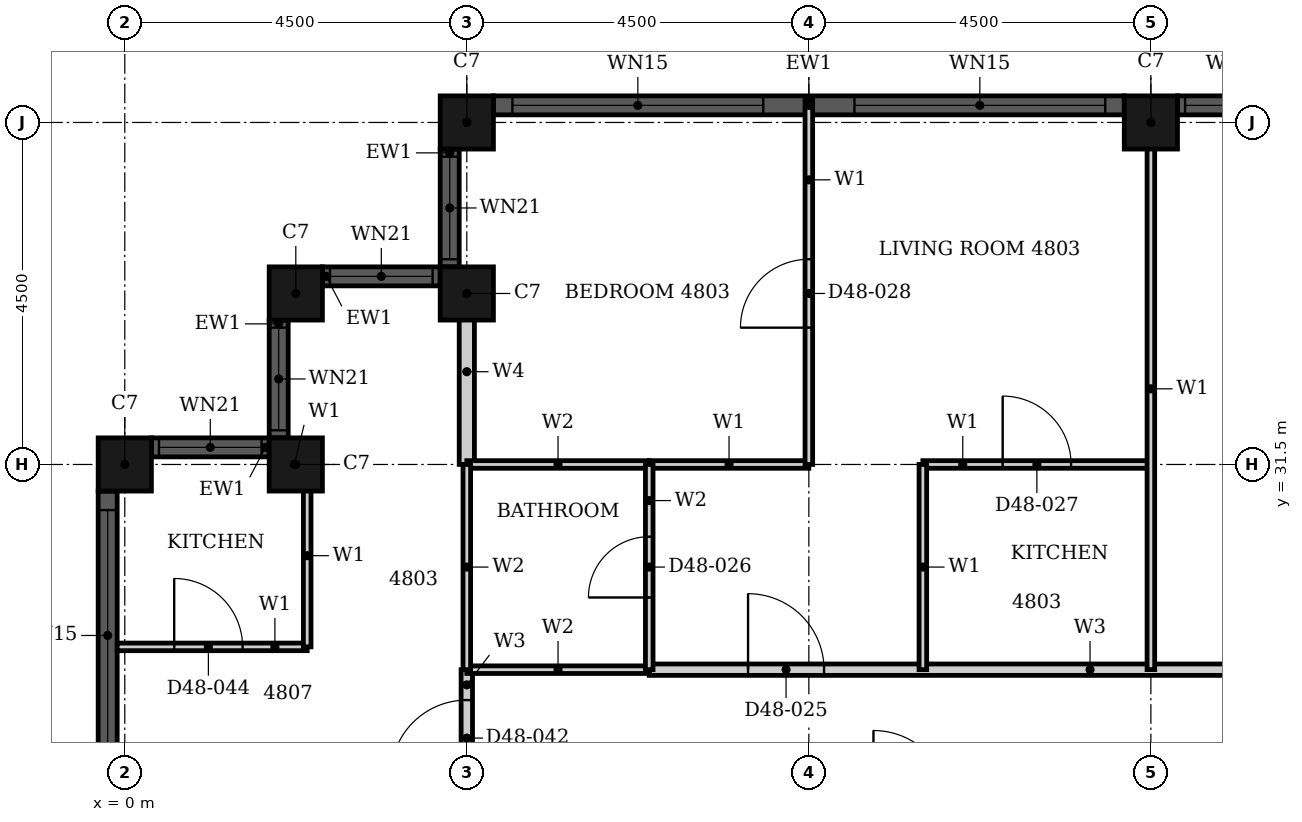
"""IFC4 building model, lengths in metres.
Left out: names, types, materials, properties, quantities, classifications, styles, units other than length and angle.
Written with IfcOpenShell. Run it as: python <this file> out.ifc"""

import sys

from ifc_helpers import new_model, si_unit, direction, frame, frame_2d, origin, origin_2d, place, context, subcontext, project, spatial, rectangle, hollow_rectangle, extrude, element, fill, save


model = new_model("IFC4")
c1 = context("Model", 3, precision=1e-05, world=origin(), true_north=direction((0.0, 1.0)))
c2 = subcontext(c1, "Body", "Model", "MODEL_VIEW")
j1 = project(units=[si_unit("LENGTHUNIT", "METRE"), si_unit("PLANEANGLEUNIT", "RADIAN")], contexts=[c1])
p1 = place(None, origin())
s1 = spatial("IfcSite", under=j1, at=p1, CompositionType="ELEMENT")
p2 = place(p1, origin())
s2 = spatial("IfcBuilding", under=s1, at=p2, CompositionType="ELEMENT")
p3 = place(p2, frame((0.0, 0.0, 192.4)))
s3 = spatial("IfcBuildingStorey", under=s2, at=p3, CompositionType="ELEMENT", Elevation=192.4)
for number, where, z_axis, x_axis in (
    (1, (13.5, 36.0, 0.0), (0.0, 0.0, 1.0), (1.0, 0.0, 0.0)),
    (2, (4.5, 36.0, 0.0), (0.0, 0.0, 1.0), (1.0, 0.0, 0.0)),
    (3, (4.5, 33.75, 0.0), (0.0, 0.0, 1.0), (1.0, 0.0, 0.0)),
    (4, (2.25, 33.75, 0.0), (0.0, 0.0, 1.0), (1.0, 0.0, 0.0)),
    (5, (2.25, 31.5, 0.0), (0.0, 0.0, 1.0), (1.0, 0.0, 0.0)),
    (6, (0.0, 31.5, 0.0), (0.0, 0.0, 1.0), (1.0, 0.0, 0.0)),
):
    element("IfcColumn", number, at=place(p3, frame(where, z_axis=z_axis, x_axis=x_axis)), inside=s3, PredefinedType="COLUMN", context=c2, shape_type="SweptSolid", body=[
        extrude(hollow_rectangle(XDim=0.7, YDim=0.7, WallThickness=0.022, at=origin_2d()), origin(), (0.0, 0.0, 1.0), 3.7),
    ])
p4 = place(p3, frame((15.4, 36.225, 0.0), z_axis=(0.0, 0.0, 1.0), x_axis=(-1.0, 0.0, 0.0)))
e7 = element("IfcWall", 7, at=p4, inside=s3, PredefinedType="SOLIDWALL", context=c2, shape_type="SweptSolid", body=[
    extrude(rectangle(XDim=1.55, YDim=0.25, at=frame_2d((0.775, 0.0))), origin(), (0.0, 0.0, 1.0), 3.7),
])
p5 = place(p4, frame((0.1, 0.0, 0.9)))
e8 = element("IfcOpeningElement", 8, at=p5, cuts=e7, PredefinedType="OPENING", context=c2, shape_type="SweptSolid", body=[
    extrude(rectangle(XDim=1.35, YDim=1.85, at=frame_2d((0.675, 0.925))), frame((0.0, 0.135, 0.0), z_axis=(0.0, -1.0, 0.0), x_axis=(1.0, 0.0, 0.0)), (0.0, 0.0, 1.0), 0.27),
])
p6 = place(p3, frame((13.15, 36.225, 0.0), z_axis=(0.0, 0.0, 1.0), x_axis=(-1.0, 0.0, 0.0)))
e9 = element("IfcWall", 9, at=p6, inside=s3, PredefinedType="SOLIDWALL", context=c2, shape_type="SweptSolid", body=[
    extrude(rectangle(XDim=8.3, YDim=0.25, at=frame_2d((4.15, 0.0))), origin(), (0.0, 0.0, 1.0), 3.7),
])
p7 = place(p6, frame((0.25, 0.0, 0.45)))
e10 = element("IfcOpeningElement", 10, at=p7, cuts=e9, PredefinedType="OPENING", context=c2, shape_type="SweptSolid", body=[
    extrude(rectangle(XDim=3.3, YDim=2.3, at=frame_2d((1.65, 1.15))), frame((0.0, 0.135, 0.0), z_axis=(0.0, -1.0, 0.0), x_axis=(1.0, 0.0, 0.0)), (0.0, 0.0, 1.0), 0.27),
])
p8 = place(p6, frame((4.75, 0.0, 0.45)))
e11 = element("IfcOpeningElement", 11, at=p8, cuts=e9, PredefinedType="OPENING", context=c2, shape_type="SweptSolid", body=[
    extrude(rectangle(XDim=3.3, YDim=2.3, at=frame_2d((1.65, 1.15))), frame((0.0, 0.135, 0.0), z_axis=(0.0, -1.0, 0.0), x_axis=(1.0, 0.0, 0.0)), (0.0, 0.0, 1.0), 0.27),
])
p9 = place(p3, frame((4.275, 35.65, 0.0), z_axis=(0.0, 0.0, 1.0), x_axis=(0.0, -1.0, 0.0)))
e12 = element("IfcWall", 12, at=p9, inside=s3, PredefinedType="SOLIDWALL", context=c2, shape_type="SweptSolid", body=[
    extrude(rectangle(XDim=1.55, YDim=0.25, at=frame_2d((0.775, 0.0))), origin(), (0.0, 0.0, 1.0), 3.7),
])
p10 = place(p9, frame((0.1, 0.0, 0.9)))
e13 = element("IfcOpeningElement", 13, at=p10, cuts=e12, PredefinedType="OPENING", context=c2, shape_type="SweptSolid", body=[
    extrude(rectangle(XDim=1.35, YDim=1.85, at=frame_2d((0.675, 0.925))), frame((0.0, 0.135, 0.0), z_axis=(0.0, -1.0, 0.0), x_axis=(1.0, 0.0, 0.0)), (0.0, 0.0, 1.0), 0.27),
])
p11 = place(p3, frame((4.15, 33.975, 0.0), z_axis=(0.0, 0.0, 1.0), x_axis=(-1.0, 0.0, 0.0)))
e14 = element("IfcWall", 14, at=p11, inside=s3, PredefinedType="SOLIDWALL", context=c2, shape_type="SweptSolid", body=[
    extrude(rectangle(XDim=1.55, YDim=0.25, at=frame_2d((0.775, 0.0))), origin(), (0.0, 0.0, 1.0), 3.7),
])
p12 = place(p11, frame((0.1, 0.0, 0.9)))
e15 = element("IfcOpeningElement", 15, at=p12, cuts=e14, PredefinedType="OPENING", context=c2, shape_type="SweptSolid", body=[
    extrude(rectangle(XDim=1.35, YDim=1.85, at=frame_2d((0.675, 0.925))), frame((0.0, 0.135, 0.0), z_axis=(0.0, -1.0, 0.0), x_axis=(1.0, 0.0, 0.0)), (0.0, 0.0, 1.0), 0.27),
])
p13 = place(p3, frame((2.025, 33.4, 0.0), z_axis=(0.0, 0.0, 1.0), x_axis=(0.0, -1.0, 0.0)))
e16 = element("IfcWall", 16, at=p13, inside=s3, PredefinedType="SOLIDWALL", context=c2, shape_type="SweptSolid", body=[
    extrude(rectangle(XDim=1.55, YDim=0.25, at=frame_2d((0.775, 0.0))), origin(), (0.0, 0.0, 1.0), 3.7),
])
p14 = place(p13, frame((0.1, 0.0, 0.9)))
e17 = element("IfcOpeningElement", 17, at=p14, cuts=e16, PredefinedType="OPENING", context=c2, shape_type="SweptSolid", body=[
    extrude(rectangle(XDim=1.35, YDim=1.85, at=frame_2d((0.675, 0.925))), frame((0.0, 0.135, 0.0), z_axis=(0.0, -1.0, 0.0), x_axis=(1.0, 0.0, 0.0)), (0.0, 0.0, 1.0), 0.27),
])
p15 = place(p3, frame((1.9, 31.725, 0.0), z_axis=(0.0, 0.0, 1.0), x_axis=(-1.0, 0.0, 0.0)))
e18 = element("IfcWall", 18, at=p15, inside=s3, PredefinedType="SOLIDWALL", context=c2, shape_type="SweptSolid", body=[
    extrude(rectangle(XDim=1.55, YDim=0.25, at=frame_2d((0.775, 0.0))), origin(), (0.0, 0.0, 1.0), 3.7),
])
p16 = place(p15, frame((0.1, 0.0, 0.9)))
e19 = element("IfcOpeningElement", 19, at=p16, cuts=e18, PredefinedType="OPENING", context=c2, shape_type="SweptSolid", body=[
    extrude(rectangle(XDim=1.35, YDim=1.85, at=frame_2d((0.675, 0.925))), frame((0.0, 0.135, 0.0), z_axis=(0.0, -1.0, 0.0), x_axis=(1.0, 0.0, 0.0)), (0.0, 0.0, 1.0), 0.27),
])
p17 = place(p3, frame((-0.225, 31.15, 0.0), z_axis=(0.0, 0.0, 1.0), x_axis=(0.0, -1.0, 0.0)))
e20 = element("IfcWall", 20, at=p17, inside=s3, PredefinedType="SOLIDWALL", context=c2, shape_type="SweptSolid", body=[
    extrude(rectangle(XDim=8.3, YDim=0.25, at=frame_2d((4.15, 0.0))), origin(), (0.0, 0.0, 1.0), 3.7),
])
p18 = place(p17, frame((0.25, 0.0, 0.45)))
e21 = element("IfcOpeningElement", 21, at=p18, cuts=e20, PredefinedType="OPENING", context=c2, shape_type="SweptSolid", body=[
    extrude(rectangle(XDim=3.3, YDim=2.3, at=frame_2d((1.65, 1.15))), frame((0.0, 0.135, 0.0), z_axis=(0.0, -1.0, 0.0), x_axis=(1.0, 0.0, 0.0)), (0.0, 0.0, 1.0), 0.27),
])
p19 = place(p17, frame((4.75, 0.0, 0.45)))
e22 = element("IfcOpeningElement", 22, at=p19, cuts=e20, PredefinedType="OPENING", context=c2, shape_type="SweptSolid", body=[
    extrude(rectangle(XDim=3.3, YDim=2.3, at=frame_2d((1.65, 1.15))), frame((0.0, 0.135, 0.0), z_axis=(0.0, -1.0, 0.0), x_axis=(1.0, 0.0, 0.0)), (0.0, 0.0, 1.0), 0.27),
])
p20 = place(p3, frame((6.9, 28.8, 0.0), z_axis=(0.0, 0.0, 1.0), x_axis=(1.0, 0.0, 0.0)))
e23 = element("IfcWall", 23, at=p20, inside=s3, PredefinedType="PARTITIONING", context=c2, shape_type="SweptSolid", body=[
    extrude(rectangle(XDim=9.299, YDim=0.15, at=frame_2d((4.649, 0.0))), origin(), (0.0, 0.0, 1.0), 3.4),
])
p21 = place(p20, frame((1.3, 0.0, 0.0)))
e24 = element("IfcOpeningElement", 24, at=p21, cuts=e23, PredefinedType="OPENING", context=c2, shape_type="SweptSolid", body=[
    extrude(rectangle(XDim=1.0, YDim=2.2, at=frame_2d((0.5, 1.1))), frame((0.0, 0.085, 0.0), z_axis=(0.0, -1.0, 0.0), x_axis=(1.0, 0.0, 0.0)), (0.0, 0.0, 1.0), 0.17),
])
p22 = place(p3, frame((4.5, 27.0, 0.0), z_axis=(0.0, 0.0, 1.0), x_axis=(0.0, 1.0, 0.0)))
e25 = element("IfcWall", 25, at=p22, inside=s3, PredefinedType="PARTITIONING", context=c2, shape_type="SweptSolid", body=[
    extrude(rectangle(XDim=1.8, YDim=0.15, at=frame_2d((0.9, 0.0))), origin(), (0.0, 0.0, 1.0), 3.4),
])
p23 = place(p22, frame((0.4, 0.0, 0.0)))
e26 = element("IfcOpeningElement", 26, at=p23, cuts=e25, PredefinedType="OPENING", context=c2, shape_type="SweptSolid", body=[
    extrude(rectangle(XDim=1.0, YDim=2.2, at=frame_2d((0.5, 1.1))), frame((0.0, 0.085, 0.0), z_axis=(0.0, -1.0, 0.0), x_axis=(1.0, 0.0, 0.0)), (0.0, 0.0, 1.0), 0.17),
])
p24 = place(p3, frame((-0.1, 29.1, 0.0), z_axis=(0.0, 0.0, 1.0), x_axis=(1.0, 0.0, 0.0)))
e27 = element("IfcWall", 27, at=p24, inside=s3, PredefinedType="PARTITIONING", context=c2, shape_type="SweptSolid", body=[
    extrude(rectangle(XDim=2.5, YDim=0.1, at=frame_2d((1.25, 0.0))), origin(), (0.0, 0.0, 1.0), 3.4),
])
p25 = place(p24, frame((0.75, 0.0, 0.0)))
e28 = element("IfcOpeningElement", 28, at=p25, cuts=e27, PredefinedType="OPENING", context=c2, shape_type="SweptSolid", body=[
    extrude(rectangle(XDim=0.9, YDim=2.1, at=frame_2d((0.45, 1.05))), frame((0.0, 0.06, 0.0), z_axis=(0.0, -1.0, 0.0), x_axis=(1.0, 0.0, 0.0)), (0.0, 0.0, 1.0), 0.12),
])
p26 = place(p3, frame((6.9, 31.5, 0.0), z_axis=(0.0, 0.0, 1.0), x_axis=(1.0, 0.0, 0.0)))
e29 = element("IfcWall", 29, at=p26, inside=s3, PredefinedType="PARTITIONING", context=c2, shape_type="SweptSolid", body=[
    extrude(rectangle(XDim=2.1, YDim=0.1, at=frame_2d((1.05, 0.0))), origin(), (0.0, 0.0, 1.0), 2.68),
])
p27 = place(p3, frame((10.5, 31.5, 0.0), z_axis=(0.0, 0.0, 1.0), x_axis=(1.0, 0.0, 0.0)))
e30 = element("IfcWall", 30, at=p27, inside=s3, PredefinedType="PARTITIONING", context=c2, shape_type="SweptSolid", body=[
    extrude(rectangle(XDim=3.0, YDim=0.1, at=frame_2d((1.5, 0.0))), origin(), (0.0, 0.0, 1.0), 2.68),
])
p28 = place(p27, frame((1.05, 0.0, 0.0)))
e31 = element("IfcOpeningElement", 31, at=p28, cuts=e30, PredefinedType="OPENING", context=c2, shape_type="SweptSolid", body=[
    extrude(rectangle(XDim=0.9, YDim=2.1, at=frame_2d((0.45, 1.05))), frame((0.0, 0.06, 0.0), z_axis=(0.0, -1.0, 0.0), x_axis=(1.0, 0.0, 0.0)), (0.0, 0.0, 1.0), 0.12),
])
p29 = place(p3, frame((2.06, 31.5, 0.0), z_axis=(0.0, 0.0, 1.0), x_axis=(1.0, 0.0, 0.0)))
e32 = element("IfcWall", 32, at=p29, inside=s3, PredefinedType="PARTITIONING", context=c2, shape_type="SweptSolid", body=[
    extrude(rectangle(XDim=0.34, YDim=0.1, at=frame_2d((0.17, 0.0))), origin(), (0.0, 0.0, 1.0), 3.4),
])
p30 = place(p3, frame((10.5, 28.8, 0.0), z_axis=(0.0, 0.0, 1.0), x_axis=(0.0, 1.0, 0.0)))
e33 = element("IfcWall", 33, at=p30, inside=s3, PredefinedType="PARTITIONING", context=c2, shape_type="SweptSolid", body=[
    extrude(rectangle(XDim=2.7, YDim=0.1, at=frame_2d((1.35, 0.0))), origin(), (0.0, 0.0, 1.0), 3.4),
])
p31 = place(p3, frame((13.5, 28.801, 0.0), z_axis=(0.0, 0.0, 1.0), x_axis=(0.0, 1.0, 0.0)))
e34 = element("IfcWall", 34, at=p31, inside=s3, PredefinedType="PARTITIONING", context=c2, shape_type="SweptSolid", body=[
    extrude(rectangle(XDim=7.389, YDim=0.1, at=frame_2d((3.694, 0.0))), origin(), (0.0, 0.0, 1.0), 2.48),
])
p32 = place(p3, frame((2.4, 29.1, 0.0), z_axis=(0.0, 0.0, 1.0), x_axis=(0.0, 1.0, 0.0)))
e35 = element("IfcWall", 35, at=p32, inside=s3, PredefinedType="PARTITIONING", context=c2, shape_type="SweptSolid", body=[
    extrude(rectangle(XDim=2.4, YDim=0.1, at=frame_2d((1.2, 0.0))), origin(), (0.0, 0.0, 1.0), 3.4),
])
p33 = place(p3, frame((9.0, 31.5, 0.0), z_axis=(0.0, 0.0, 1.0), x_axis=(0.0, 1.0, 0.0)))
e36 = element("IfcWall", 36, at=p33, inside=s3, PredefinedType="PARTITIONING", context=c2, shape_type="SweptSolid", body=[
    extrude(rectangle(XDim=4.79, YDim=0.1, at=frame_2d((2.395, 0.0))), origin(), (0.0, 0.0, 1.0), 3.4),
])
p34 = place(p33, frame((1.8, 0.0, 0.0)))
e37 = element("IfcOpeningElement", 37, at=p34, cuts=e36, PredefinedType="OPENING", context=c2, shape_type="SweptSolid", body=[
    extrude(rectangle(XDim=0.9, YDim=2.1, at=frame_2d((0.45, 1.05))), frame((0.0, 0.06, 0.0), z_axis=(0.0, -1.0, 0.0), x_axis=(1.0, 0.0, 0.0)), (0.0, 0.0, 1.0), 0.12),
])
p35 = place(p3, frame((4.5, 31.501, 0.0), z_axis=(0.0, 0.0, 1.0), x_axis=(0.0, 1.0, 0.0)))
e38 = element("IfcWall", 38, at=p35, inside=s3, PredefinedType="PARTITIONING", context=c2, shape_type="SweptSolid", body=[
    extrude(rectangle(XDim=2.439, YDim=0.2, at=frame_2d((1.219, 0.0))), origin(), (0.0, 0.0, 1.0), 3.4),
])
p36 = place(p3, frame((4.5, 28.8, 0.0), z_axis=(0.0, 0.0, 1.0), x_axis=(1.0, 0.0, 0.0)))
e39 = element("IfcWall", 39, at=p36, inside=s3, PredefinedType="PARTITIONING", context=c2, shape_type="SweptSolid", body=[
    extrude(rectangle(XDim=2.4, YDim=0.1, at=frame_2d((1.2, 0.0))), origin(), (0.0, 0.0, 1.0), 3.4),
])
p37 = place(p3, frame((4.5, 31.5, 0.0), z_axis=(0.0, 0.0, 1.0), x_axis=(1.0, 0.0, 0.0)))
e40 = element("IfcWall", 40, at=p37, inside=s3, PredefinedType="PARTITIONING", context=c2, shape_type="SweptSolid", body=[
    extrude(rectangle(XDim=2.4, YDim=0.1, at=frame_2d((1.2, 0.0))), origin(), (0.0, 0.0, 1.0), 2.68),
])
p38 = place(p3, frame((4.5, 28.8, 0.0), z_axis=(0.0, 0.0, 1.0), x_axis=(0.0, 1.0, 0.0)))
e41 = element("IfcWall", 41, at=p38, inside=s3, PredefinedType="PARTITIONING", context=c2, shape_type="SweptSolid", body=[
    extrude(rectangle(XDim=2.7, YDim=0.1, at=frame_2d((1.35, 0.0))), origin(), (0.0, 0.0, 1.0), 3.4),
])
p39 = place(p3, frame((6.9, 28.8, 0.0), z_axis=(0.0, 0.0, 1.0), x_axis=(0.0, 1.0, 0.0)))
e42 = element("IfcWall", 42, at=p39, inside=s3, PredefinedType="PARTITIONING", context=c2, shape_type="SweptSolid", body=[
    extrude(rectangle(XDim=2.7, YDim=0.1, at=frame_2d((1.35, 0.0))), origin(), (0.0, 0.0, 1.0), 3.4),
])
p40 = place(p39, frame((0.95, 0.0, 0.0)))
e43 = element("IfcOpeningElement", 43, at=p40, cuts=e42, PredefinedType="OPENING", context=c2, shape_type="SweptSolid", body=[
    extrude(rectangle(XDim=0.8, YDim=2.1, at=frame_2d((0.4, 1.05))), frame((0.0, 0.06, 0.0), z_axis=(0.0, -1.0, 0.0), x_axis=(1.0, 0.0, 0.0)), (0.0, 0.0, 1.0), 0.12),
])
p41 = place(p5, origin())
e44 = element("IfcWindow", 44, at=p41, inside=s3, PartitioningType="SINGLE_PANEL", PredefinedType="WINDOW", context=c2, shape_type="SweptSolid", body=[
    extrude(rectangle(XDim=1.35, YDim=1.85, at=frame_2d((0.675, 0.925))), frame((0.0, 0.03, 0.0), z_axis=(0.0, -1.0, 0.0), x_axis=(1.0, 0.0, 0.0)), (0.0, 0.0, 1.0), 0.06),
])
fill(e8, e44)
p42 = place(p7, origin())
e45 = element("IfcWindow", 45, at=p42, inside=s3, PartitioningType="SINGLE_PANEL", PredefinedType="WINDOW", context=c2, shape_type="SweptSolid", body=[
    extrude(rectangle(XDim=3.3, YDim=2.3, at=frame_2d((1.65, 1.15))), frame((0.0, 0.03, 0.0), z_axis=(0.0, -1.0, 0.0), x_axis=(1.0, 0.0, 0.0)), (0.0, 0.0, 1.0), 0.06),
])
fill(e10, e45)
p43 = place(p8, origin())
e46 = element("IfcWindow", 46, at=p43, inside=s3, PartitioningType="SINGLE_PANEL", PredefinedType="WINDOW", context=c2, shape_type="SweptSolid", body=[
    extrude(rectangle(XDim=3.3, YDim=2.3, at=frame_2d((1.65, 1.15))), frame((0.0, 0.03, 0.0), z_axis=(0.0, -1.0, 0.0), x_axis=(1.0, 0.0, 0.0)), (0.0, 0.0, 1.0), 0.06),
])
fill(e11, e46)
p44 = place(p10, origin())
e47 = element("IfcWindow", 47, at=p44, inside=s3, PartitioningType="SINGLE_PANEL", PredefinedType="WINDOW", context=c2, shape_type="SweptSolid", body=[
    extrude(rectangle(XDim=1.35, YDim=1.85, at=frame_2d((0.675, 0.925))), frame((0.0, 0.03, 0.0), z_axis=(0.0, -1.0, 0.0), x_axis=(1.0, 0.0, 0.0)), (0.0, 0.0, 1.0), 0.06),
])
fill(e13, e47)
p45 = place(p12, origin())
e48 = element("IfcWindow", 48, at=p45, inside=s3, PartitioningType="SINGLE_PANEL", PredefinedType="WINDOW", context=c2, shape_type="SweptSolid", body=[
    extrude(rectangle(XDim=1.35, YDim=1.85, at=frame_2d((0.675, 0.925))), frame((0.0, 0.03, 0.0), z_axis=(0.0, -1.0, 0.0), x_axis=(1.0, 0.0, 0.0)), (0.0, 0.0, 1.0), 0.06),
])
fill(e15, e48)
p46 = place(p14, origin())
e49 = element("IfcWindow", 49, at=p46, inside=s3, PartitioningType="SINGLE_PANEL", PredefinedType="WINDOW", context=c2, shape_type="SweptSolid", body=[
    extrude(rectangle(XDim=1.35, YDim=1.85, at=frame_2d((0.675, 0.925))), frame((0.0, 0.03, 0.0), z_axis=(0.0, -1.0, 0.0), x_axis=(1.0, 0.0, 0.0)), (0.0, 0.0, 1.0), 0.06),
])
fill(e17, e49)
p47 = place(p16, origin())
e50 = element("IfcWindow", 50, at=p47, inside=s3, PartitioningType="SINGLE_PANEL", PredefinedType="WINDOW", context=c2, shape_type="SweptSolid", body=[
    extrude(rectangle(XDim=1.35, YDim=1.85, at=frame_2d((0.675, 0.925))), frame((0.0, 0.03, 0.0), z_axis=(0.0, -1.0, 0.0), x_axis=(1.0, 0.0, 0.0)), (0.0, 0.0, 1.0), 0.06),
])
fill(e19, e50)
p48 = place(p18, origin())
e51 = element("IfcWindow", 51, at=p48, inside=s3, PartitioningType="SINGLE_PANEL", PredefinedType="WINDOW", context=c2, shape_type="SweptSolid", body=[
    extrude(rectangle(XDim=3.3, YDim=2.3, at=frame_2d((1.65, 1.15))), frame((0.0, 0.03, 0.0), z_axis=(0.0, -1.0, 0.0), x_axis=(1.0, 0.0, 0.0)), (0.0, 0.0, 1.0), 0.06),
])
fill(e21, e51)
p49 = place(p21, origin())
e52 = element("IfcDoor", 52, at=p49, inside=s3, OperationType="SINGLE_SWING_RIGHT", PredefinedType="DOOR", context=c2, shape_type="SweptSolid", body=[
    extrude(rectangle(XDim=1.0, YDim=2.2, at=frame_2d((0.5, 1.1))), frame((0.0, 0.025, 0.0), z_axis=(0.0, -1.0, 0.0), x_axis=(1.0, 0.0, 0.0)), (0.0, 0.0, 1.0), 0.05),
])
fill(e24, e52)
p50 = place(p40, origin())
e53 = element("IfcDoor", 53, at=p50, inside=s3, OperationType="SINGLE_SWING_RIGHT", PredefinedType="DOOR", context=c2, shape_type="SweptSolid", body=[
    extrude(rectangle(XDim=0.8, YDim=2.1, at=frame_2d((0.4, 1.05))), frame((0.0, 0.025, 0.0), z_axis=(0.0, -1.0, 0.0), x_axis=(1.0, 0.0, 0.0)), (0.0, 0.0, 1.0), 0.05),
])
fill(e43, e53)
p51 = place(p28, origin())
e54 = element("IfcDoor", 54, at=p51, inside=s3, OperationType="SINGLE_SWING_LEFT", PredefinedType="DOOR", context=c2, shape_type="SweptSolid", body=[
    extrude(rectangle(XDim=0.9, YDim=2.1, at=frame_2d((0.45, 1.05))), frame((0.0, 0.025, 0.0), z_axis=(0.0, -1.0, 0.0), x_axis=(1.0, 0.0, 0.0)), (0.0, 0.0, 1.0), 0.05),
])
fill(e31, e54)
p52 = place(p34, origin())
e55 = element("IfcDoor", 55, at=p52, inside=s3, OperationType="SINGLE_SWING_LEFT", PredefinedType="DOOR", context=c2, shape_type="SweptSolid", body=[
    extrude(rectangle(XDim=0.9, YDim=2.1, at=frame_2d((0.45, 1.05))), frame((0.0, 0.025, 0.0), z_axis=(0.0, -1.0, 0.0), x_axis=(1.0, 0.0, 0.0)), (0.0, 0.0, 1.0), 0.05),
])
fill(e37, e55)
p53 = place(p23, origin())
e56 = element("IfcDoor", 56, at=p53, inside=s3, OperationType="SINGLE_SWING_LEFT", PredefinedType="DOOR", context=c2, shape_type="SweptSolid", body=[
    extrude(rectangle(XDim=1.0, YDim=2.2, at=frame_2d((0.5, 1.1))), frame((0.0, 0.025, 0.0), z_axis=(0.0, -1.0, 0.0), x_axis=(1.0, 0.0, 0.0)), (0.0, 0.0, 1.0), 0.05),
])
fill(e26, e56)
p54 = place(p25, origin())
e57 = element("IfcDoor", 57, at=p54, inside=s3, OperationType="SINGLE_SWING_RIGHT", PredefinedType="DOOR", context=c2, shape_type="SweptSolid", body=[
    extrude(rectangle(XDim=0.9, YDim=2.1, at=frame_2d((0.45, 1.05))), frame((0.0, 0.025, 0.0), z_axis=(0.0, -1.0, 0.0), x_axis=(1.0, 0.0, 0.0)), (0.0, 0.0, 1.0), 0.05),
])
fill(e28, e57)
save(model, sys.argv[1])
